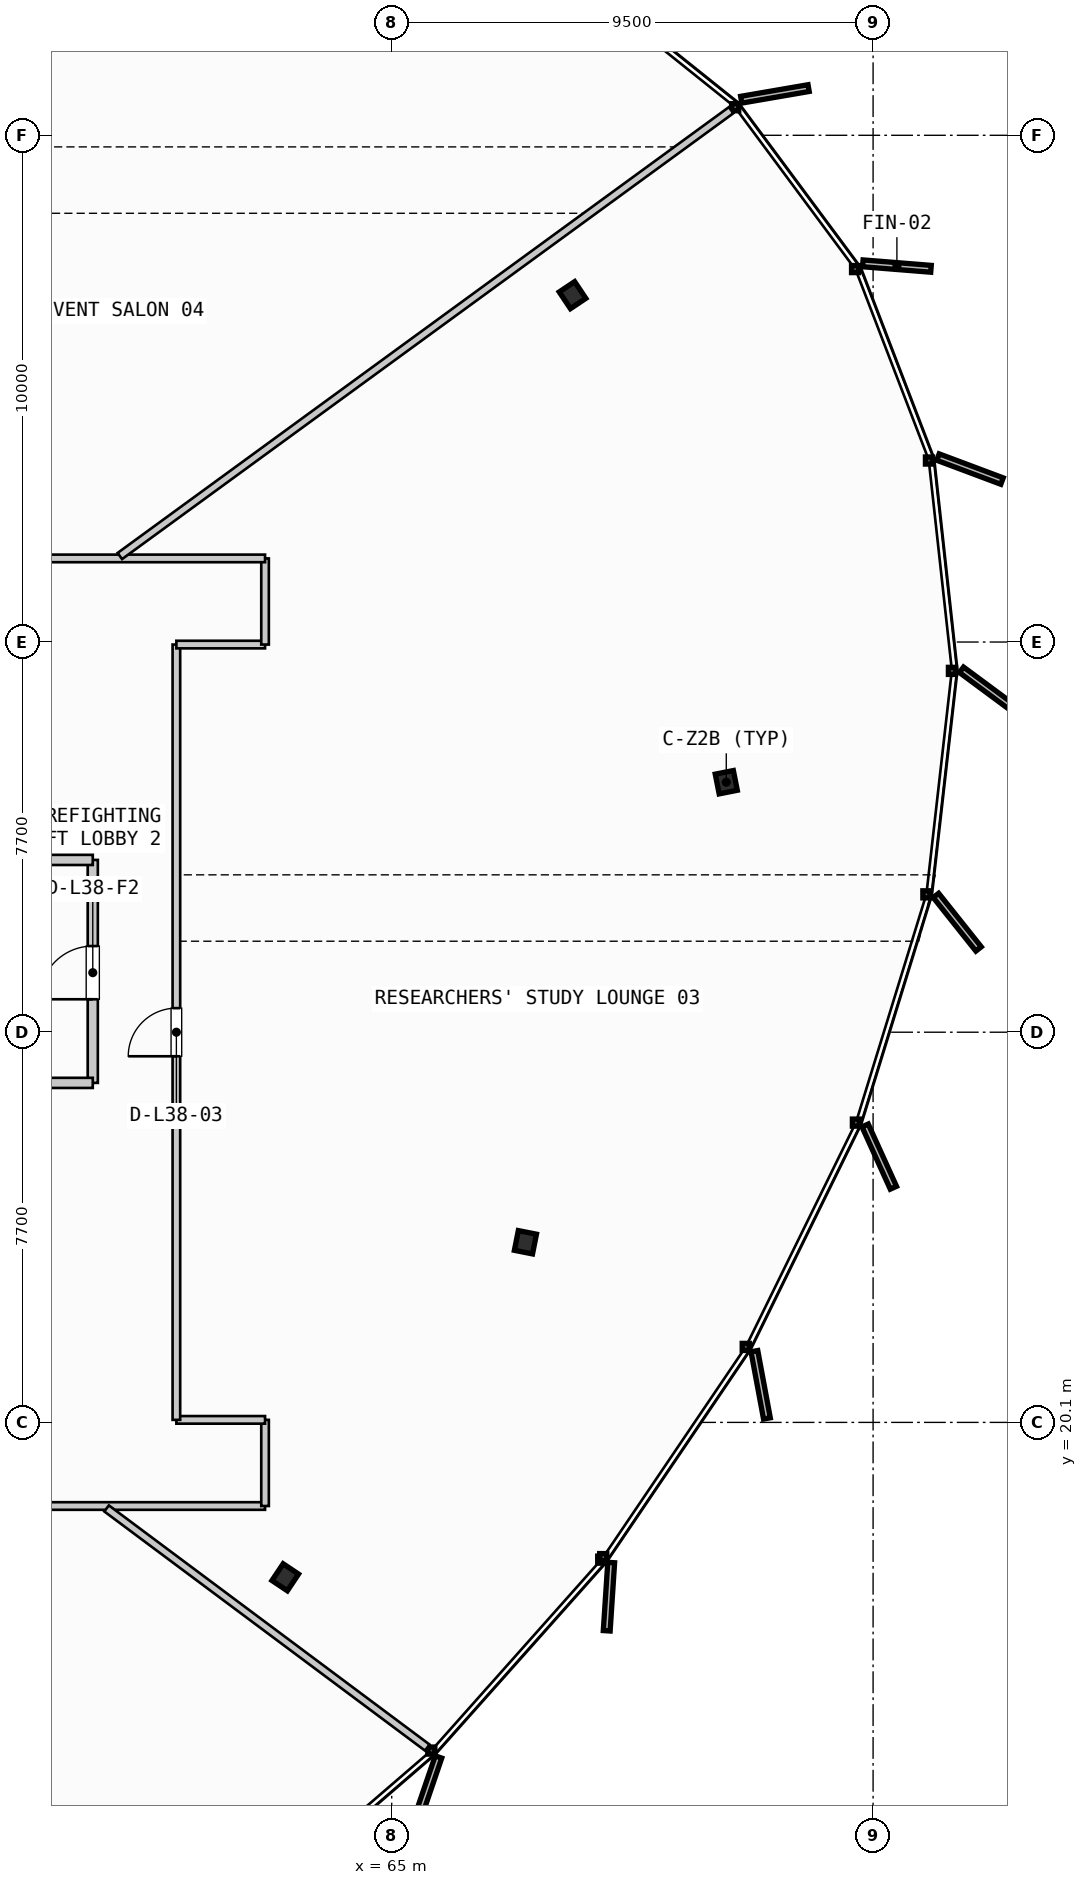
"""IFC4 building model, lengths in metres.
Left out: names, types, materials, properties, quantities, classifications, styles, units other than length and angle.
Written with IfcOpenShell. Run it as: python <this file> out.ifc"""

import sys

from ifc_helpers import new_model, si_unit, direction, frame, frame_2d, origin, origin_2d, place, context, subcontext, project, spatial, rectangle, i_section, extrude, source, transform, mapped, element, fill, save


model = new_model("IFC4")
c1 = context("Model", 3, precision=1e-05, world=origin(), true_north=direction((0.0, 1.0)))
c2 = subcontext(c1, "Body", "Model", "MODEL_VIEW")
j1 = project(units=[si_unit("LENGTHUNIT", "METRE"), si_unit("PLANEANGLEUNIT", "RADIAN")], contexts=[c1])
p1 = place(None, origin())
s1 = spatial("IfcSite", under=j1, at=p1, CompositionType="ELEMENT")
p2 = place(p1, origin())
s2 = spatial("IfcBuilding", under=s1, at=p2, CompositionType="ELEMENT")
p3 = place(p2, frame((0.0, 0.0, 150.1)))
s3 = spatial("IfcBuildingStorey", under=s2, at=p3, CompositionType="ELEMENT", Elevation=150.1)
m1 = source(origin(), c2, "Body", "SweptSolid", [
    extrude(i_section(OverallWidth=0.397, OverallDepth=0.365, WebThickness=0.028, FlangeThickness=0.044, FilletRadius=0.015, at=origin_2d()), origin(), (0.0, 0.0, 1.0), 3.3),
])
for number, where, z_axis, x_axis in (
    (1, (71.603, 32.733, 0.0), (0.0, 0.0, 1.0), (0.981, 0.195, 0.0)),
    (2, (68.569, 42.345, 0.0), (0.0, 0.0, 1.0), (0.831, 0.556, 0.0)),
    (3, (62.899, 17.043, 0.0), (0.0, 0.0, 1.0), (0.831, -0.556, 0.0)),
    (4, (67.639, 23.655, 0.0), (0.0, 0.0, 1.0), (0.981, -0.195, 0.0)),
):
    element("IfcColumn", number, at=place(p3, frame(where, z_axis=z_axis, x_axis=x_axis)), inside=s3, PredefinedType="COLUMN", context=c2, shape_type="MappedRepresentation", body=[
        mapped(m1, transform((0.0, 0.0, 0.0), scale=1.0)),
    ])
p4 = place(p3, frame((59.1, 26.8, 0.0), z_axis=(0.0, 0.0, 1.0), x_axis=(0.0, 1.0, 0.0)))
e5 = element("IfcWall", 5, at=p4, inside=s3, PredefinedType="PARTITIONING", context=c2, shape_type="SweptSolid", body=[
    extrude(rectangle(XDim=4.4, YDim=0.2, at=frame_2d((2.2, 0.0))), origin(), (0.0, 0.0, 1.0), 2.28),
])
p5 = place(p4, frame((1.65, 0.0, 0.0)))
e6 = element("IfcOpeningElement", 6, at=p5, cuts=e5, PredefinedType="OPENING", context=c2, shape_type="SweptSolid", body=[
    extrude(rectangle(XDim=1.05, YDim=2.15, at=frame_2d((0.525, 1.075))), frame((0.0, 0.11, 0.0), z_axis=(0.0, -1.0, 0.0), x_axis=(1.0, 0.0, 0.0)), (0.0, 0.0, 1.0), 0.22),
])
for number, where, z_axis, x_axis in (
    (7, (55.885, 26.8, 0.0), (0.0, 0.0, 1.0), (1.0, 0.0, 0.0)),
    (8, (55.885, 31.2, 0.0), (0.0, 0.0, 1.0), (1.0, 0.0, 0.0)),
):
    element("IfcWall", number, at=place(p3, frame(where, z_axis=z_axis, x_axis=x_axis)), inside=s3, PredefinedType="PARTITIONING", context=c2, shape_type="SweptSolid", body=[
        extrude(rectangle(XDim=3.215, YDim=0.2, at=frame_2d((1.607, 0.0))), origin(), (0.0, 0.0, 1.0), 2.28),
    ])
p6 = place(p3, frame((31.1, 18.45, 0.0), z_axis=(0.0, 0.0, 1.0), x_axis=(1.0, 0.0, 0.0)))
e9 = element("IfcWall", 9, at=p6, inside=s3, PredefinedType="PARTITIONING", context=c2, shape_type="SweptSolid", body=[
    extrude(rectangle(XDim=31.4, YDim=0.15, at=frame_2d((15.7, 0.0))), origin(), (0.0, 0.0, 1.0), 2.28),
])
p7 = place(p6, frame((7.517, 0.0, 0.0)))
e10 = element("IfcOpeningElement", 10, at=p7, cuts=e9, PredefinedType="OPENING", context=c2, shape_type="SweptSolid", body=[
    extrude(rectangle(XDim=0.95, YDim=2.15, at=frame_2d((0.475, 1.075))), frame((0.0, 0.085, 0.0), z_axis=(0.0, -1.0, 0.0), x_axis=(1.0, 0.0, 0.0)), (0.0, 0.0, 1.0), 0.17),
])
p8 = place(p6, frame((20.149, 0.0, 0.0)))
e11 = element("IfcOpeningElement", 11, at=p8, cuts=e9, PredefinedType="OPENING", context=c2, shape_type="SweptSolid", body=[
    extrude(rectangle(XDim=0.95, YDim=2.15, at=frame_2d((0.475, 1.075))), frame((0.0, 0.085, 0.0), z_axis=(0.0, -1.0, 0.0), x_axis=(1.0, 0.0, 0.0)), (0.0, 0.0, 1.0), 0.17),
])
p9 = place(p3, frame((62.5, 18.45, 0.0), z_axis=(0.0, 0.0, 1.0), x_axis=(0.0, 1.0, 0.0)))
e12 = element("IfcWall", 12, at=p9, inside=s3, PredefinedType="PARTITIONING", context=c2, shape_type="SweptSolid", body=[
    extrude(rectangle(XDim=1.7, YDim=0.15, at=frame_2d((0.85, 0.0))), origin(), (0.0, 0.0, 1.0), 2.28),
])
p10 = place(p3, frame((62.5, 20.15, 0.0), z_axis=(0.0, 0.0, 1.0), x_axis=(-1.0, 0.0, 0.0)))
e13 = element("IfcWall", 13, at=p10, inside=s3, PredefinedType="PARTITIONING", context=c2, shape_type="SweptSolid", body=[
    extrude(rectangle(XDim=1.75, YDim=0.15, at=frame_2d((0.875, 0.0))), origin(), (0.0, 0.0, 1.0), 2.28),
])
p11 = place(p3, frame((60.75, 20.15, 0.0), z_axis=(0.0, 0.0, 1.0), x_axis=(0.0, 1.0, 0.0)))
e14 = element("IfcWall", 14, at=p11, inside=s3, PredefinedType="PARTITIONING", context=c2, shape_type="SweptSolid", body=[
    extrude(rectangle(XDim=15.3, YDim=0.15, at=frame_2d((7.65, 0.0))), origin(), (0.0, 0.0, 1.0), 2.28),
])
p12 = place(p11, frame((7.175, 0.0, 0.0)))
e15 = element("IfcOpeningElement", 15, at=p12, cuts=e14, PredefinedType="OPENING", context=c2, shape_type="SweptSolid", body=[
    extrude(rectangle(XDim=0.95, YDim=2.15, at=frame_2d((0.475, 1.075))), frame((0.0, 0.085, 0.0), z_axis=(0.0, -1.0, 0.0), x_axis=(1.0, 0.0, 0.0)), (0.0, 0.0, 1.0), 0.17),
])
p13 = place(p3, frame((60.75, 35.45, 0.0), z_axis=(0.0, 0.0, 1.0), x_axis=(1.0, 0.0, 0.0)))
e16 = element("IfcWall", 16, at=p13, inside=s3, PredefinedType="PARTITIONING", context=c2, shape_type="SweptSolid", body=[
    extrude(rectangle(XDim=1.75, YDim=0.15, at=frame_2d((0.875, 0.0))), origin(), (0.0, 0.0, 1.0), 2.28),
])
p14 = place(p3, frame((62.5, 35.45, 0.0), z_axis=(0.0, 0.0, 1.0), x_axis=(0.0, 1.0, 0.0)))
e17 = element("IfcWall", 17, at=p14, inside=s3, PredefinedType="PARTITIONING", context=c2, shape_type="SweptSolid", body=[
    extrude(rectangle(XDim=1.7, YDim=0.15, at=frame_2d((0.85, 0.0))), origin(), (0.0, 0.0, 1.0), 2.28),
])
p15 = place(p3, frame((62.5, 37.15, 0.0), z_axis=(0.0, 0.0, 1.0), x_axis=(-1.0, 0.0, 0.0)))
e18 = element("IfcWall", 18, at=p15, inside=s3, PredefinedType="PARTITIONING", context=c2, shape_type="SweptSolid", body=[
    extrude(rectangle(XDim=31.4, YDim=0.15, at=frame_2d((15.7, 0.0))), origin(), (0.0, 0.0, 1.0), 2.28),
])
p16 = place(p15, frame((7.179, 0.0, 0.0)))
e19 = element("IfcOpeningElement", 19, at=p16, cuts=e18, PredefinedType="OPENING", context=c2, shape_type="SweptSolid", body=[
    extrude(rectangle(XDim=0.95, YDim=2.15, at=frame_2d((0.475, 1.075))), frame((0.0, 0.085, 0.0), z_axis=(0.0, -1.0, 0.0), x_axis=(1.0, 0.0, 0.0)), (0.0, 0.0, 1.0), 0.17),
])
p17 = place(p15, frame((19.89, 0.0, 0.0)))
e20 = element("IfcOpeningElement", 20, at=p17, cuts=e18, PredefinedType="OPENING", context=c2, shape_type="SweptSolid", body=[
    extrude(rectangle(XDim=0.95, YDim=2.15, at=frame_2d((0.475, 1.075))), frame((0.0, 0.085, 0.0), z_axis=(0.0, -1.0, 0.0), x_axis=(1.0, 0.0, 0.0)), (0.0, 0.0, 1.0), 0.17),
])
p18 = place(p3, frame((59.373, 18.402, 0.0), z_axis=(0.0, 0.0, 1.0), x_axis=(0.801659629697, -0.59778076091, 0.0)))
e21 = element("IfcWall", 21, at=p18, inside=s3, PredefinedType="PARTITIONING", context=c2, shape_type="SweptSolid", body=[
    extrude(rectangle(XDim=7.894, YDim=0.15, at=frame_2d((3.947, 0.0))), origin(), (0.0, 0.0, 1.0), 2.28),
])
p19 = place(p3, frame((59.634, 37.197, 0.0), z_axis=(0.0, 0.0, 1.0), x_axis=(0.807951901315, 0.58924844095, 0.0)))
e22 = element("IfcWall", 22, at=p19, inside=s3, PredefinedType="PARTITIONING", context=c2, shape_type="SweptSolid", body=[
    extrude(rectangle(XDim=14.931, YDim=0.15, at=frame_2d((7.465, 0.0))), origin(), (0.0, 0.0, 1.0), 2.28),
])
m2 = source(origin(), c2, "Body", "SweptSolid", [
    extrude(rectangle(XDim=1.05, YDim=2.15, at=frame_2d((0.525, 1.075))), frame((0.0, 0.025, 0.0), z_axis=(0.0, -1.0, 0.0), x_axis=(1.0, 0.0, 0.0)), (0.0, 0.0, 1.0), 0.05),
])
p20 = place(p5, origin())
e23 = element("IfcDoor", 23, at=p20, inside=s3, OperationType="SINGLE_SWING_LEFT", PredefinedType="DOOR", context=c2, shape_type="MappedRepresentation", body=[
    mapped(m2, transform((0.0, 0.0, 0.0), scale=1.0)),
])
fill(e6, e23)
m3 = source(origin(), c2, "Body", "SweptSolid", [
    extrude(rectangle(XDim=0.95, YDim=2.15, at=frame_2d((0.475, 1.075))), frame((0.0, 0.025, 0.0), z_axis=(0.0, -1.0, 0.0), x_axis=(1.0, 0.0, 0.0)), (0.0, 0.0, 1.0), 0.05),
])
p21 = place(p12, origin())
e24 = element("IfcDoor", 24, at=p21, inside=s3, OperationType="SINGLE_SWING_LEFT", PredefinedType="DOOR", context=c2, shape_type="MappedRepresentation", body=[
    mapped(m3, transform((0.0, 0.0, 0.0), scale=1.0)),
])
fill(e15, e24)
save(model, sys.argv[1])
